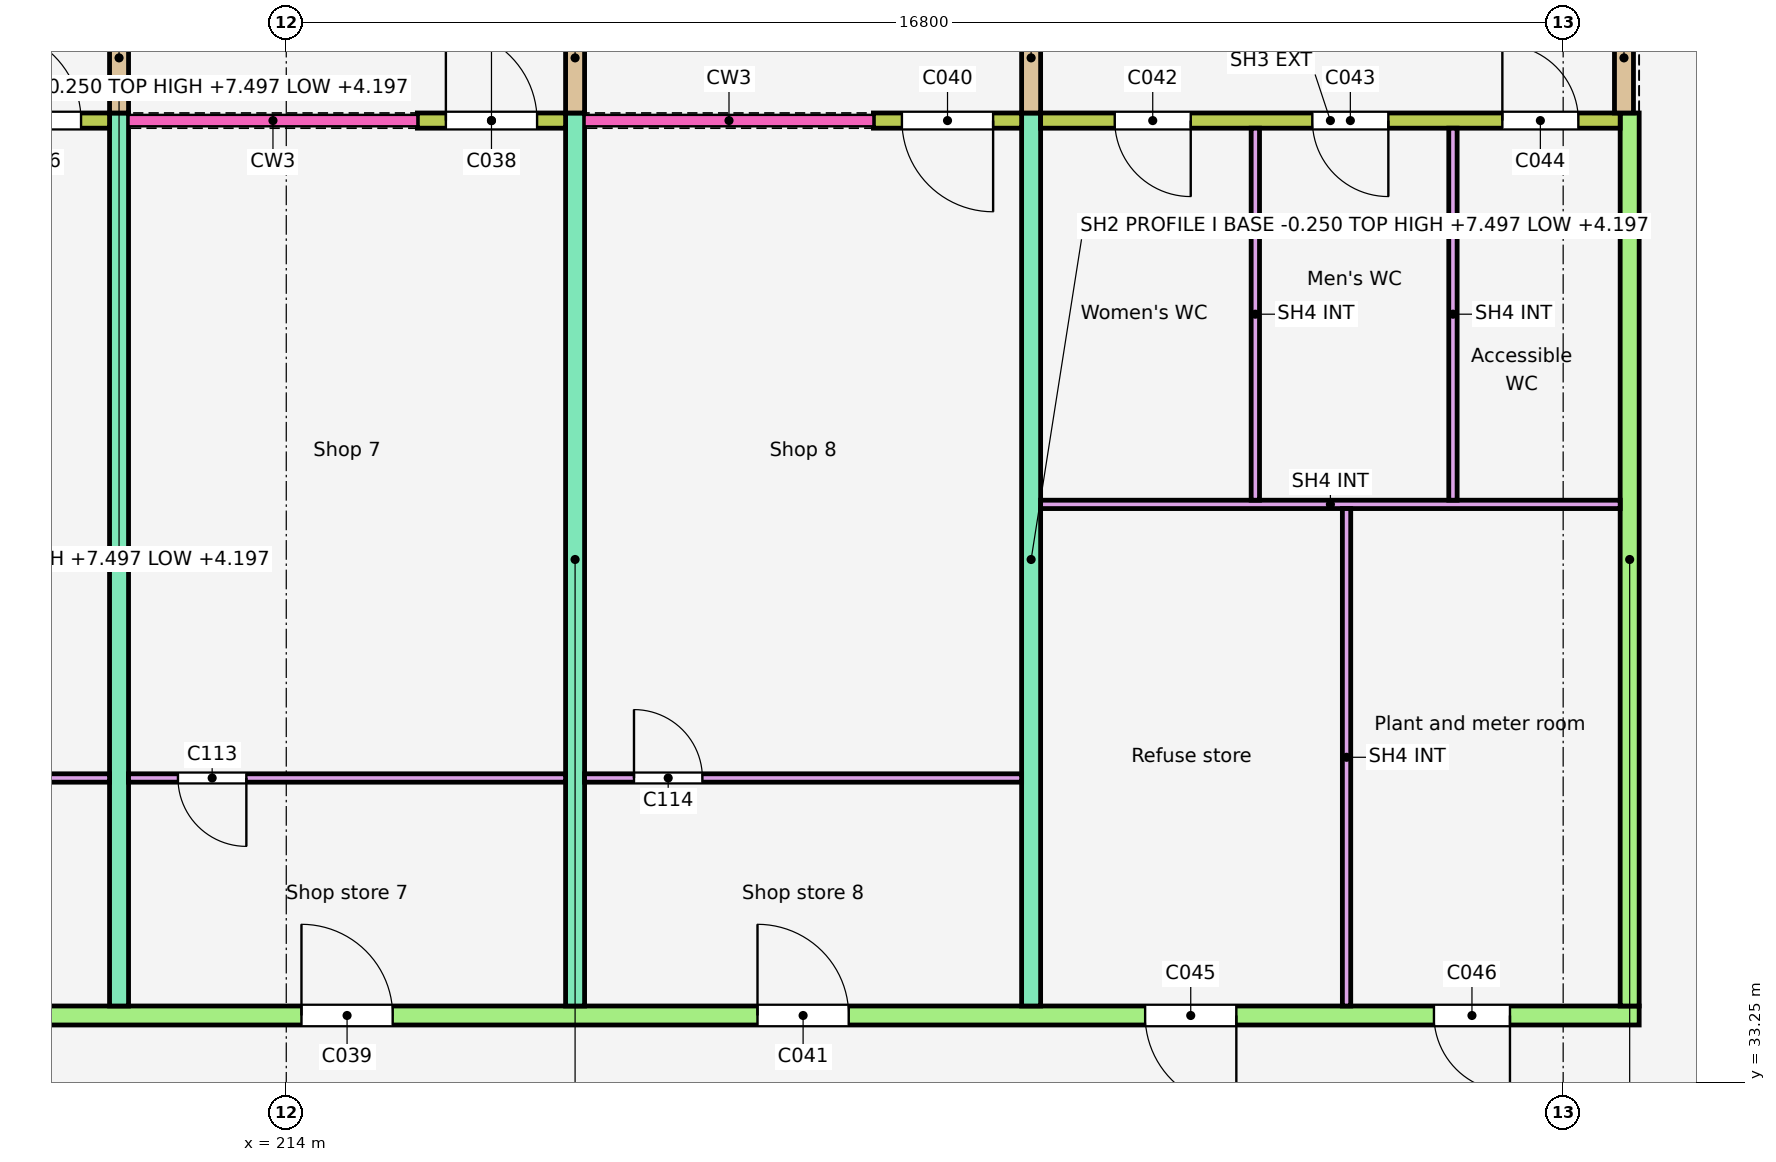
"""IFC4 building model, lengths in metres.
Left out: names, types, materials, properties, quantities, classifications, styles, units other than length and angle.
Written with IfcOpenShell. Run it as: python <this file> out.ifc"""

import sys

from ifc_helpers import new_model, si_unit, direction, frame, frame_2d, origin, place, context, subcontext, project, spatial, polyline, rectangle, outline, extrude, element, fill, save


model = new_model("IFC4")
c1 = context("Model", 3, precision=1e-05, world=origin(), true_north=direction((0.0, 1.0)))
c2 = subcontext(c1, "Body", "Model", "MODEL_VIEW")
j1 = project(units=[si_unit("LENGTHUNIT", "METRE"), si_unit("PLANEANGLEUNIT", "RADIAN")], contexts=[c1])
p1 = place(None, origin())
s1 = spatial("IfcSite", under=j1, at=p1, CompositionType="ELEMENT")
p2 = place(p1, origin())
s2 = spatial("IfcBuilding", under=s1, at=p2, CompositionType="ELEMENT")
p3 = place(p2, origin())
s3 = spatial("IfcBuildingStorey", under=s2, at=p3, CompositionType="ELEMENT", Elevation=0.0)
p4 = place(p3, frame((175.8, 34.125, -0.25), z_axis=(0.0, 0.0, 1.0), x_axis=(1.0, 0.0, 0.0)))
e1 = element("IfcWall", 1, at=p4, inside=s3, PredefinedType="SOLIDWALL", context=c2, shape_type="SweptSolid", body=[
    extrude(rectangle(XDim=56.0, YDim=0.25, at=frame_2d((28.0, 0.0))), origin(), (0.0, 0.0, 1.0), 4.445),
])
p5 = place(p4, frame((2.462, 0.0, 0.25)))
e2 = element("IfcOpeningElement", 2, at=p5, cuts=e1, PredefinedType="OPENING", context=c2, shape_type="SweptSolid", body=[
    extrude(rectangle(XDim=1.2, YDim=2.1, at=frame_2d((0.6, 1.05))), frame((0.0, 0.135, 0.0), z_axis=(0.0, -1.0, 0.0), x_axis=(1.0, 0.0, 0.0)), (0.0, 0.0, 1.0), 0.27),
])
p6 = place(p4, frame((8.4, 0.0, 0.25)))
e3 = element("IfcOpeningElement", 3, at=p6, cuts=e1, PredefinedType="OPENING", context=c2, shape_type="SweptSolid", body=[
    extrude(rectangle(XDim=1.2, YDim=2.1, at=frame_2d((0.6, 1.05))), frame((0.0, 0.135, 0.0), z_axis=(0.0, -1.0, 0.0), x_axis=(1.0, 0.0, 0.0)), (0.0, 0.0, 1.0), 0.27),
])
p7 = place(p4, frame((14.4, 0.0, 0.25)))
e4 = element("IfcOpeningElement", 4, at=p7, cuts=e1, PredefinedType="OPENING", context=c2, shape_type="SweptSolid", body=[
    extrude(rectangle(XDim=1.2, YDim=2.1, at=frame_2d((0.6, 1.05))), frame((0.0, 0.135, 0.0), z_axis=(0.0, -1.0, 0.0), x_axis=(1.0, 0.0, 0.0)), (0.0, 0.0, 1.0), 0.27),
])
p8 = place(p4, frame((20.4, 0.0, 0.25)))
e5 = element("IfcOpeningElement", 5, at=p8, cuts=e1, PredefinedType="OPENING", context=c2, shape_type="SweptSolid", body=[
    extrude(rectangle(XDim=1.2, YDim=2.1, at=frame_2d((0.6, 1.05))), frame((0.0, 0.135, 0.0), z_axis=(0.0, -1.0, 0.0), x_axis=(1.0, 0.0, 0.0)), (0.0, 0.0, 1.0), 0.27),
])
p9 = place(p4, frame((26.4, 0.0, 0.25)))
e6 = element("IfcOpeningElement", 6, at=p9, cuts=e1, PredefinedType="OPENING", context=c2, shape_type="SweptSolid", body=[
    extrude(rectangle(XDim=1.2, YDim=2.1, at=frame_2d((0.6, 1.05))), frame((0.0, 0.135, 0.0), z_axis=(0.0, -1.0, 0.0), x_axis=(1.0, 0.0, 0.0)), (0.0, 0.0, 1.0), 0.27),
])
p10 = place(p4, frame((32.4, 0.0, 0.25)))
e7 = element("IfcOpeningElement", 7, at=p10, cuts=e1, PredefinedType="OPENING", context=c2, shape_type="SweptSolid", body=[
    extrude(rectangle(XDim=1.2, YDim=2.1, at=frame_2d((0.6, 1.05))), frame((0.0, 0.135, 0.0), z_axis=(0.0, -1.0, 0.0), x_axis=(1.0, 0.0, 0.0)), (0.0, 0.0, 1.0), 0.27),
])
p11 = place(p4, frame((38.4, 0.0, 0.25)))
e8 = element("IfcOpeningElement", 8, at=p11, cuts=e1, PredefinedType="OPENING", context=c2, shape_type="SweptSolid", body=[
    extrude(rectangle(XDim=1.2, YDim=2.1, at=frame_2d((0.6, 1.05))), frame((0.0, 0.135, 0.0), z_axis=(0.0, -1.0, 0.0), x_axis=(1.0, 0.0, 0.0)), (0.0, 0.0, 1.0), 0.27),
])
p12 = place(p4, frame((44.4, 0.0, 0.25)))
e9 = element("IfcOpeningElement", 9, at=p12, cuts=e1, PredefinedType="OPENING", context=c2, shape_type="SweptSolid", body=[
    extrude(rectangle(XDim=1.2, YDim=2.1, at=frame_2d((0.6, 1.05))), frame((0.0, 0.135, 0.0), z_axis=(0.0, -1.0, 0.0), x_axis=(1.0, 0.0, 0.0)), (0.0, 0.0, 1.0), 0.27),
])
p13 = place(p4, frame((49.5, 0.0, 0.25)))
e10 = element("IfcOpeningElement", 10, at=p13, cuts=e1, PredefinedType="OPENING", context=c2, shape_type="SweptSolid", body=[
    extrude(rectangle(XDim=1.2, YDim=2.1, at=frame_2d((0.6, 1.05))), frame((0.0, 0.135, 0.0), z_axis=(0.0, -1.0, 0.0), x_axis=(1.0, 0.0, 0.0)), (0.0, 0.0, 1.0), 0.27),
])
p14 = place(p4, frame((53.3, 0.0, 0.25)))
e11 = element("IfcOpeningElement", 11, at=p14, cuts=e1, PredefinedType="OPENING", context=c2, shape_type="SweptSolid", body=[
    extrude(rectangle(XDim=1.0, YDim=2.1, at=frame_2d((0.5, 1.05))), frame((0.0, 0.135, 0.0), z_axis=(0.0, -1.0, 0.0), x_axis=(1.0, 0.0, 0.0)), (0.0, 0.0, 1.0), 0.27),
])
for number, where, z_axis, x_axis in (
    (12, (231.675, 34.25, -0.25), (0.0, 0.0, 1.0), (0.0, 1.0, 0.0)),
    (13, (211.8, 34.25, -0.25), (0.0, 0.0, 1.0), (0.0, 1.0, 0.0)),
    (14, (217.8, 34.25, -0.25), (0.0, 0.0, 1.0), (0.0, 1.0, 0.0)),
    (15, (223.8, 34.25, -0.25), (0.0, 0.0, 1.0), (0.0, 1.0, 0.0)),
):
    element("IfcWall", number, at=place(p3, frame(where, z_axis=z_axis, x_axis=x_axis)), inside=s3, PredefinedType="SOLIDWALL", context=c2, shape_type="SweptSolid", body=[
        extrude(outline(polyline([(0.0, 0.0), (11.75, 0.0), (11.55, 7.663), (7.726, 4.447), (7.725, 7.747), (3.801, 4.447), (3.8, 7.747), (0.0, 4.552), (0.0, 0.0)])), frame((0.0, 0.125, 0.0), z_axis=(0.0, -1.0, 0.0), x_axis=(1.0, 0.0, 0.0)), (0.0, 0.0, 1.0), 0.25),
    ])
p15 = place(p3, frame((209.725, 45.9, -0.25), z_axis=(0.0, 0.0, 1.0), x_axis=(1.0, 0.0, 0.0)))
e16 = element("IfcWall", 16, at=p15, inside=s3, PredefinedType="SOLIDWALL", context=c2, shape_type="SweptSolid", body=[
    extrude(rectangle(XDim=1.95, YDim=0.2, at=frame_2d((0.975, 0.0))), origin(), (0.0, 0.0, 1.0), 4.45),
])
p16 = place(p15, frame((0.375, 0.0, 0.25)))
e17 = element("IfcOpeningElement", 17, at=p16, cuts=e16, PredefinedType="OPENING", context=c2, shape_type="SweptSolid", body=[
    extrude(rectangle(XDim=1.2, YDim=2.1, at=frame_2d((0.6, 1.05))), frame((0.0, 0.11, 0.0), z_axis=(0.0, -1.0, 0.0), x_axis=(1.0, 0.0, 0.0)), (0.0, 0.0, 1.0), 0.22),
])
p17 = place(p3, frame((215.725, 45.9, -0.25), z_axis=(0.0, 0.0, 1.0), x_axis=(1.0, 0.0, 0.0)))
e18 = element("IfcWall", 18, at=p17, inside=s3, PredefinedType="SOLIDWALL", context=c2, shape_type="SweptSolid", body=[
    extrude(rectangle(XDim=1.95, YDim=0.2, at=frame_2d((0.975, 0.0))), origin(), (0.0, 0.0, 1.0), 4.45),
])
p18 = place(p17, frame((0.375, 0.0, 0.25)))
e19 = element("IfcOpeningElement", 19, at=p18, cuts=e18, PredefinedType="OPENING", context=c2, shape_type="SweptSolid", body=[
    extrude(rectangle(XDim=1.2, YDim=2.1, at=frame_2d((0.6, 1.05))), frame((0.0, 0.11, 0.0), z_axis=(0.0, -1.0, 0.0), x_axis=(1.0, 0.0, 0.0)), (0.0, 0.0, 1.0), 0.22),
])
p19 = place(p3, frame((221.725, 45.9, -0.25), z_axis=(0.0, 0.0, 1.0), x_axis=(1.0, 0.0, 0.0)))
e20 = element("IfcWall", 20, at=p19, inside=s3, PredefinedType="SOLIDWALL", context=c2, shape_type="SweptSolid", body=[
    extrude(rectangle(XDim=1.95, YDim=0.2, at=frame_2d((0.975, 0.0))), origin(), (0.0, 0.0, 1.0), 4.45),
])
p20 = place(p19, frame((0.375, 0.0, 0.25)))
e21 = element("IfcOpeningElement", 21, at=p20, cuts=e20, PredefinedType="OPENING", context=c2, shape_type="SweptSolid", body=[
    extrude(rectangle(XDim=1.2, YDim=2.1, at=frame_2d((0.6, 1.05))), frame((0.0, 0.11, 0.0), z_axis=(0.0, -1.0, 0.0), x_axis=(1.0, 0.0, 0.0)), (0.0, 0.0, 1.0), 0.22),
])
p21 = place(p3, frame((223.925, 45.9, -0.25), z_axis=(0.0, 0.0, 1.0), x_axis=(1.0, 0.0, 0.0)))
e22 = element("IfcWall", 22, at=p21, inside=s3, PredefinedType="SOLIDWALL", context=c2, shape_type="SweptSolid", body=[
    extrude(rectangle(XDim=7.625, YDim=0.2, at=frame_2d((3.812, 0.0))), origin(), (0.0, 0.0, 1.0), 4.45),
])
p22 = place(p21, frame((0.975, 0.0, 0.25)))
e23 = element("IfcOpeningElement", 23, at=p22, cuts=e22, PredefinedType="OPENING", context=c2, shape_type="SweptSolid", body=[
    extrude(rectangle(XDim=1.0, YDim=2.1, at=frame_2d((0.5, 1.05))), frame((0.0, 0.11, 0.0), z_axis=(0.0, -1.0, 0.0), x_axis=(1.0, 0.0, 0.0)), (0.0, 0.0, 1.0), 0.22),
])
p23 = place(p21, frame((3.575, 0.0, 0.25)))
e24 = element("IfcOpeningElement", 24, at=p23, cuts=e22, PredefinedType="OPENING", context=c2, shape_type="SweptSolid", body=[
    extrude(rectangle(XDim=1.0, YDim=2.1, at=frame_2d((0.5, 1.05))), frame((0.0, 0.11, 0.0), z_axis=(0.0, -1.0, 0.0), x_axis=(1.0, 0.0, 0.0)), (0.0, 0.0, 1.0), 0.22),
])
p24 = place(p21, frame((6.075, 0.0, 0.25)))
e25 = element("IfcOpeningElement", 25, at=p24, cuts=e22, PredefinedType="OPENING", context=c2, shape_type="SweptSolid", body=[
    extrude(rectangle(XDim=1.0, YDim=2.1, at=frame_2d((0.5, 1.05))), frame((0.0, 0.11, 0.0), z_axis=(0.0, -1.0, 0.0), x_axis=(1.0, 0.0, 0.0)), (0.0, 0.0, 1.0), 0.22),
])
for number, where, z_axis, x_axis in (
    (26, (211.8, 46.0, -0.25), (0.0, 0.0, 1.0), (0.0, 1.0, 0.0)),
    (27, (217.8, 46.0, -0.25), (0.0, 0.0, 1.0), (0.0, 1.0, 0.0)),
    (28, (223.8, 46.0, -0.25), (0.0, 0.0, 1.0), (0.0, 1.0, 0.0)),
    (29, (231.6, 46.0, -0.25), (0.0, 0.0, 1.0), (0.0, 1.0, 0.0)),
):
    element("IfcWall", number, at=place(p3, frame(where, z_axis=z_axis, x_axis=x_axis)), inside=s3, PredefinedType="SOLIDWALL", context=c2, shape_type="SweptSolid", body=[
        extrude(outline(polyline([(0.0, 0.0), (1.45, 0.0), (1.45, 4.36), (0.0, 4.447), (0.0, 0.0)])), frame((0.0, 0.125, 0.0), z_axis=(0.0, -1.0, 0.0), x_axis=(1.0, 0.0, 0.0)), (0.0, 0.0, 1.0), 0.25),
    ])
p25 = place(p3, frame((205.925, 37.25, 0.0), z_axis=(0.0, 0.0, 1.0), x_axis=(1.0, 0.0, 0.0)))
e30 = element("IfcWall", 30, at=p25, inside=s3, PredefinedType="PARTITIONING", context=c2, shape_type="SweptSolid", body=[
    extrude(rectangle(XDim=5.75, YDim=0.11, at=frame_2d((2.875, 0.0))), origin(), (0.0, 0.0, 1.0), 3.0),
])
p26 = place(p25, frame((0.65, 0.0, 0.0)))
e31 = element("IfcOpeningElement", 31, at=p26, cuts=e30, PredefinedType="OPENING", context=c2, shape_type="SweptSolid", body=[
    extrude(rectangle(XDim=0.9, YDim=2.1, at=frame_2d((0.45, 1.05))), frame((0.0, 0.065, 0.0), z_axis=(0.0, -1.0, 0.0), x_axis=(1.0, 0.0, 0.0)), (0.0, 0.0, 1.0), 0.13),
])
p27 = place(p3, frame((211.925, 37.25, 0.0), z_axis=(0.0, 0.0, 1.0), x_axis=(1.0, 0.0, 0.0)))
e32 = element("IfcWall", 32, at=p27, inside=s3, PredefinedType="PARTITIONING", context=c2, shape_type="SweptSolid", body=[
    extrude(rectangle(XDim=5.75, YDim=0.11, at=frame_2d((2.875, 0.0))), origin(), (0.0, 0.0, 1.0), 3.0),
])
p28 = place(p27, frame((0.65, 0.0, 0.0)))
e33 = element("IfcOpeningElement", 33, at=p28, cuts=e32, PredefinedType="OPENING", context=c2, shape_type="SweptSolid", body=[
    extrude(rectangle(XDim=0.9, YDim=2.1, at=frame_2d((0.45, 1.05))), frame((0.0, 0.065, 0.0), z_axis=(0.0, -1.0, 0.0), x_axis=(1.0, 0.0, 0.0)), (0.0, 0.0, 1.0), 0.13),
])
p29 = place(p3, frame((217.925, 37.25, 0.0), z_axis=(0.0, 0.0, 1.0), x_axis=(1.0, 0.0, 0.0)))
e34 = element("IfcWall", 34, at=p29, inside=s3, PredefinedType="PARTITIONING", context=c2, shape_type="SweptSolid", body=[
    extrude(rectangle(XDim=5.75, YDim=0.11, at=frame_2d((2.875, 0.0))), origin(), (0.0, 0.0, 1.0), 3.0),
])
p30 = place(p29, frame((0.65, 0.0, 0.0)))
e35 = element("IfcOpeningElement", 35, at=p30, cuts=e34, PredefinedType="OPENING", context=c2, shape_type="SweptSolid", body=[
    extrude(rectangle(XDim=0.9, YDim=2.1, at=frame_2d((0.45, 1.05))), frame((0.0, 0.065, 0.0), z_axis=(0.0, -1.0, 0.0), x_axis=(1.0, 0.0, 0.0)), (0.0, 0.0, 1.0), 0.13),
])
p31 = place(p3, frame((223.925, 40.85, 0.0), z_axis=(0.0, 0.0, 1.0), x_axis=(1.0, 0.0, 0.0)))
e36 = element("IfcWall", 36, at=p31, inside=s3, PredefinedType="PARTITIONING", context=c2, shape_type="SweptSolid", body=[
    extrude(rectangle(XDim=7.625, YDim=0.11, at=frame_2d((3.812, 0.0))), origin(), (0.0, 0.0, 1.0), 3.0),
])
for number, where, z_axis, x_axis in (
    (37, (226.75, 40.905, 0.0), (0.0, 0.0, 1.0), (0.0, 1.0, 0.0)),
    (38, (229.35, 40.905, 0.0), (0.0, 0.0, 1.0), (0.0, 1.0, 0.0)),
):
    element("IfcWall", number, at=place(p3, frame(where, z_axis=z_axis, x_axis=x_axis)), inside=s3, PredefinedType="PARTITIONING", context=c2, shape_type="SweptSolid", body=[
        extrude(rectangle(XDim=4.895, YDim=0.11, at=frame_2d((2.448, 0.0))), origin(), (0.0, 0.0, 1.0), 3.0),
    ])
p32 = place(p3, frame((227.95, 34.25, 0.0), z_axis=(0.0, 0.0, 1.0), x_axis=(0.0, 1.0, 0.0)))
e39 = element("IfcWall", 39, at=p32, inside=s3, PredefinedType="PARTITIONING", context=c2, shape_type="SweptSolid", body=[
    extrude(rectangle(XDim=6.545, YDim=0.11, at=frame_2d((3.272, 0.0))), origin(), (0.0, 0.0, 1.0), 3.0),
])
p33 = place(p16, origin())
e40 = element("IfcDoor", 40, at=p33, inside=s3, OperationType="SINGLE_SWING_LEFT", PredefinedType="DOOR", context=c2, shape_type="SweptSolid", body=[
    extrude(rectangle(XDim=1.2, YDim=2.1, at=frame_2d((0.6, 1.05))), frame((0.0, 0.025, 0.0), z_axis=(0.0, -1.0, 0.0), x_axis=(1.0, 0.0, 0.0)), (0.0, 0.0, 1.0), 0.05),
])
fill(e17, e40)
p34 = place(p18, origin())
e41 = element("IfcDoor", 41, at=p34, inside=s3, OperationType="SINGLE_SWING_LEFT", PredefinedType="DOOR", context=c2, shape_type="SweptSolid", body=[
    extrude(rectangle(XDim=1.2, YDim=2.1, at=frame_2d((0.6, 1.05))), frame((0.0, 0.025, 0.0), z_axis=(0.0, -1.0, 0.0), x_axis=(1.0, 0.0, 0.0)), (0.0, 0.0, 1.0), 0.05),
])
fill(e19, e41)
p35 = place(p11, origin())
e42 = element("IfcDoor", 42, at=p35, inside=s3, OperationType="SINGLE_SWING_LEFT", PredefinedType="DOOR", context=c2, shape_type="SweptSolid", body=[
    extrude(rectangle(XDim=1.2, YDim=2.1, at=frame_2d((0.6, 1.05))), frame((0.0, 0.025, 0.0), z_axis=(0.0, -1.0, 0.0), x_axis=(1.0, 0.0, 0.0)), (0.0, 0.0, 1.0), 0.05),
])
fill(e8, e42)
p36 = place(p20, origin())
e43 = element("IfcDoor", 43, at=p36, inside=s3, OperationType="SINGLE_SWING_RIGHT", PredefinedType="DOOR", context=c2, shape_type="SweptSolid", body=[
    extrude(rectangle(XDim=1.2, YDim=2.1, at=frame_2d((0.6, 1.05))), frame((0.0, 0.025, 0.0), z_axis=(0.0, -1.0, 0.0), x_axis=(1.0, 0.0, 0.0)), (0.0, 0.0, 1.0), 0.05),
])
fill(e21, e43)
p37 = place(p12, origin())
e44 = element("IfcDoor", 44, at=p37, inside=s3, OperationType="SINGLE_SWING_LEFT", PredefinedType="DOOR", context=c2, shape_type="SweptSolid", body=[
    extrude(rectangle(XDim=1.2, YDim=2.1, at=frame_2d((0.6, 1.05))), frame((0.0, 0.025, 0.0), z_axis=(0.0, -1.0, 0.0), x_axis=(1.0, 0.0, 0.0)), (0.0, 0.0, 1.0), 0.05),
])
fill(e9, e44)
p38 = place(p22, origin())
e45 = element("IfcDoor", 45, at=p38, inside=s3, OperationType="SINGLE_SWING_RIGHT", PredefinedType="DOOR", context=c2, shape_type="SweptSolid", body=[
    extrude(rectangle(XDim=1.0, YDim=2.1, at=frame_2d((0.5, 1.05))), frame((0.0, 0.025, 0.0), z_axis=(0.0, -1.0, 0.0), x_axis=(1.0, 0.0, 0.0)), (0.0, 0.0, 1.0), 0.05),
])
fill(e23, e45)
p39 = place(p23, origin())
e46 = element("IfcDoor", 46, at=p39, inside=s3, OperationType="SINGLE_SWING_RIGHT", PredefinedType="DOOR", context=c2, shape_type="SweptSolid", body=[
    extrude(rectangle(XDim=1.0, YDim=2.1, at=frame_2d((0.5, 1.05))), frame((0.0, 0.025, 0.0), z_axis=(0.0, -1.0, 0.0), x_axis=(1.0, 0.0, 0.0)), (0.0, 0.0, 1.0), 0.05),
])
fill(e24, e46)
p40 = place(p24, origin())
e47 = element("IfcDoor", 47, at=p40, inside=s3, OperationType="SINGLE_SWING_LEFT", PredefinedType="DOOR", context=c2, shape_type="SweptSolid", body=[
    extrude(rectangle(XDim=1.0, YDim=2.1, at=frame_2d((0.5, 1.05))), frame((0.0, 0.025, 0.0), z_axis=(0.0, -1.0, 0.0), x_axis=(1.0, 0.0, 0.0)), (0.0, 0.0, 1.0), 0.05),
])
fill(e25, e47)
p41 = place(p13, origin())
e48 = element("IfcDoor", 48, at=p41, inside=s3, OperationType="SINGLE_SWING_RIGHT", PredefinedType="DOOR", context=c2, shape_type="SweptSolid", body=[
    extrude(rectangle(XDim=1.2, YDim=2.1, at=frame_2d((0.6, 1.05))), frame((0.0, 0.025, 0.0), z_axis=(0.0, -1.0, 0.0), x_axis=(1.0, 0.0, 0.0)), (0.0, 0.0, 1.0), 0.05),
])
fill(e10, e48)
p42 = place(p14, origin())
e49 = element("IfcDoor", 49, at=p42, inside=s3, OperationType="SINGLE_SWING_RIGHT", PredefinedType="DOOR", context=c2, shape_type="SweptSolid", body=[
    extrude(rectangle(XDim=1.0, YDim=2.1, at=frame_2d((0.5, 1.05))), frame((0.0, 0.025, 0.0), z_axis=(0.0, -1.0, 0.0), x_axis=(1.0, 0.0, 0.0)), (0.0, 0.0, 1.0), 0.05),
])
fill(e11, e49)
p43 = place(p28, origin())
e50 = element("IfcDoor", 50, at=p43, inside=s3, OperationType="SINGLE_SWING_RIGHT", PredefinedType="DOOR", context=c2, shape_type="SweptSolid", body=[
    extrude(rectangle(XDim=0.9, YDim=2.1, at=frame_2d((0.45, 1.05))), frame((0.0, 0.025, 0.0), z_axis=(0.0, -1.0, 0.0), x_axis=(1.0, 0.0, 0.0)), (0.0, 0.0, 1.0), 0.05),
])
fill(e33, e50)
p44 = place(p30, origin())
e51 = element("IfcDoor", 51, at=p44, inside=s3, OperationType="SINGLE_SWING_LEFT", PredefinedType="DOOR", context=c2, shape_type="SweptSolid", body=[
    extrude(rectangle(XDim=0.9, YDim=2.1, at=frame_2d((0.45, 1.05))), frame((0.0, 0.025, 0.0), z_axis=(0.0, -1.0, 0.0), x_axis=(1.0, 0.0, 0.0)), (0.0, 0.0, 1.0), 0.05),
])
fill(e35, e51)
save(model, sys.argv[1])
